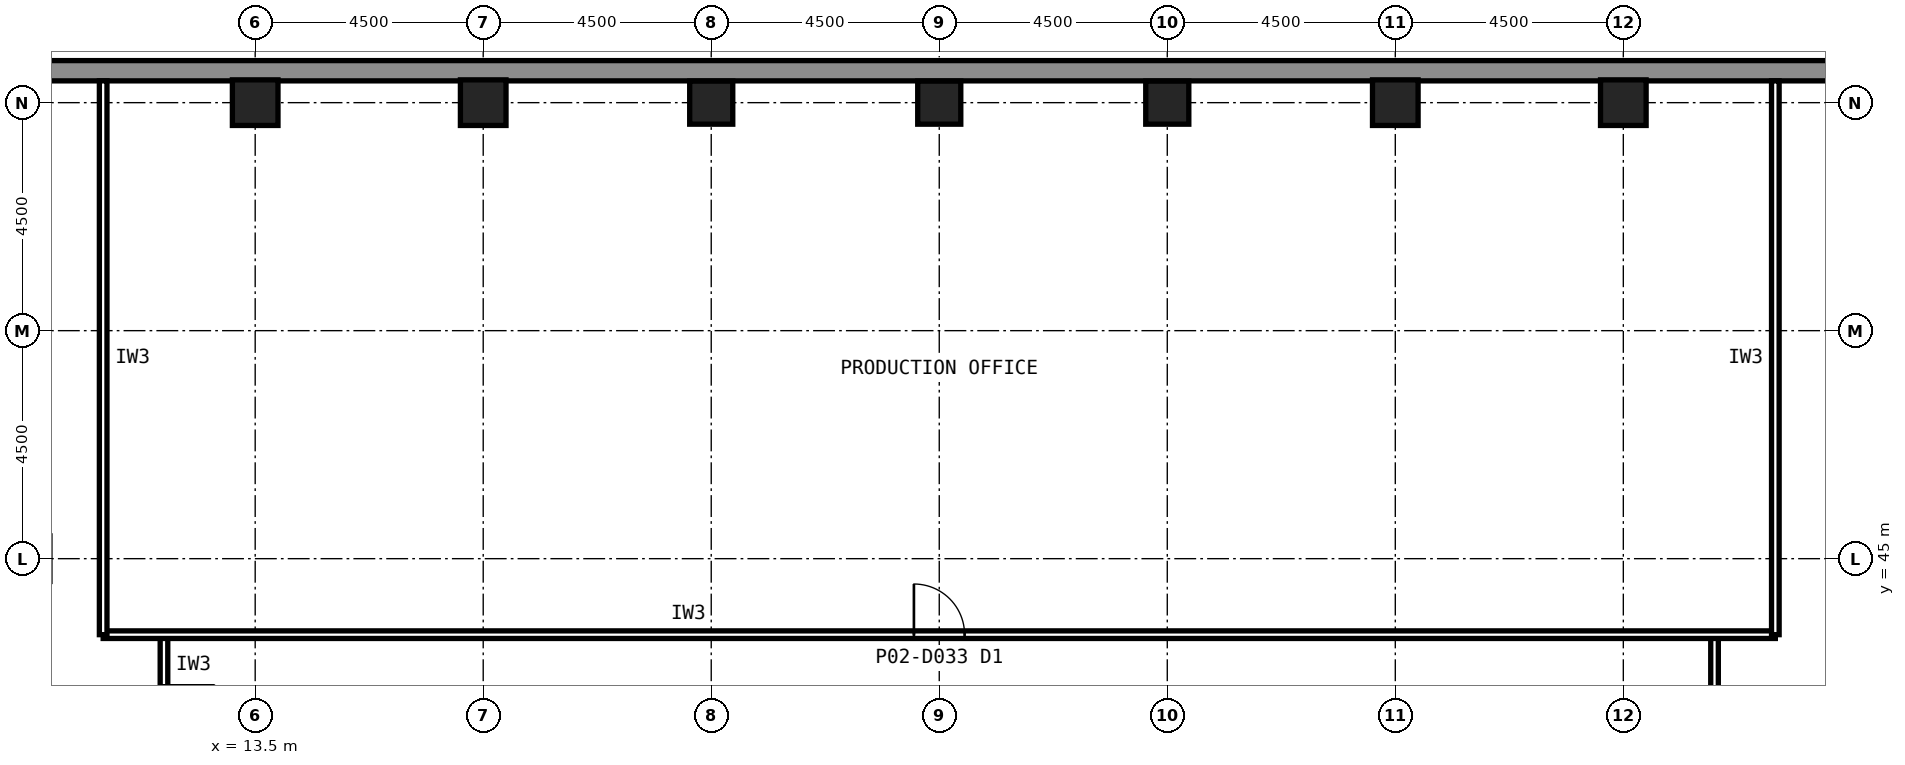
"""IFC4 building model, lengths in metres.
Left out: names, types, materials, properties, quantities, classifications, styles, units other than length and angle.
Written with IfcOpenShell. Run it as: python <this file> out.ifc"""

import sys

from ifc_helpers import new_model, si_unit, direction, frame, frame_2d, origin, origin_2d, place, context, subcontext, project, spatial, rectangle, hollow_rectangle, extrude, element, fill, save


model = new_model("IFC4")
c1 = context("Model", 3, precision=1e-05, world=origin(), true_north=direction((0.0, 1.0)))
c2 = subcontext(c1, "Body", "Model", "MODEL_VIEW")
j1 = project(units=[si_unit("LENGTHUNIT", "METRE"), si_unit("PLANEANGLEUNIT", "RADIAN")], contexts=[c1])
p1 = place(None, origin())
s1 = spatial("IfcSite", under=j1, at=p1, CompositionType="ELEMENT")
p2 = place(p1, origin())
s2 = spatial("IfcBuilding", under=s1, at=p2, CompositionType="ELEMENT")
p3 = place(p2, frame((0.0, 0.0, 6.0)))
s3 = spatial("IfcBuildingStorey", under=s2, at=p3, CompositionType="ELEMENT", Elevation=6.0)
for number, where, z_axis, x_axis in (
    (1, (40.5, 54.0, 0.0), (0.0, 0.0, 1.0), (1.0, 0.0, 0.0)),
    (2, (36.0, 54.0, 0.0), (0.0, 0.0, 1.0), (1.0, 0.0, 0.0)),
):
    element("IfcColumn", number, at=place(p3, frame(where, z_axis=z_axis, x_axis=x_axis)), inside=s3, PredefinedType="COLUMN", context=c2, shape_type="SweptSolid", body=[
        extrude(hollow_rectangle(XDim=0.9, YDim=0.9, WallThickness=0.063, at=origin_2d()), origin(), (0.0, 0.0, 1.0), 6.0),
    ])
for number, where, z_axis, x_axis in (
    (3, (31.5, 54.0, 0.0), (0.0, 0.0, 1.0), (1.0, 0.0, 0.0)),
    (4, (27.0, 54.0, 0.0), (0.0, 0.0, 1.0), (1.0, 0.0, 0.0)),
    (5, (22.5, 54.0, 0.0), (0.0, 0.0, 1.0), (1.0, 0.0, 0.0)),
):
    element("IfcColumn", number, at=place(p3, frame(where, z_axis=z_axis, x_axis=x_axis)), inside=s3, PredefinedType="COLUMN", context=c2, shape_type="SweptSolid", body=[
        extrude(hollow_rectangle(XDim=0.85, YDim=0.85, WallThickness=0.05, at=origin_2d()), origin(), (0.0, 0.0, 1.0), 6.0),
    ])
for number, where, z_axis, x_axis in (
    (6, (18.0, 54.0, 0.0), (0.0, 0.0, 1.0), (1.0, 0.0, 0.0)),
    (7, (13.5, 54.0, 0.0), (0.0, 0.0, 1.0), (1.0, 0.0, 0.0)),
):
    element("IfcColumn", number, at=place(p3, frame(where, z_axis=z_axis, x_axis=x_axis)), inside=s3, PredefinedType="COLUMN", context=c2, shape_type="SweptSolid", body=[
        extrude(hollow_rectangle(XDim=0.9, YDim=0.9, WallThickness=0.063, at=origin_2d()), origin(), (0.0, 0.0, 1.0), 6.0),
    ])
p4 = place(p3, frame((-4.761, 54.63, 0.0), z_axis=(0.0, 0.0, 1.0), x_axis=(1.0, 0.0, 0.0)))
e8 = element("IfcWall", 8, at=p4, inside=s3, PredefinedType="SOLIDWALL", context=c2, shape_type="SweptSolid", body=[
    extrude(rectangle(XDim=63.522, YDim=0.4, at=frame_2d((31.761, 0.0))), origin(), (0.0, 0.0, 1.0), 6.0),
])
p5 = place(p3, frame((42.3, 36.0, 0.0), z_axis=(0.0, 0.0, 1.0), x_axis=(0.0, 1.0, 0.0)))
e9 = element("IfcWall", 9, at=p5, inside=s3, PredefinedType="PARTITIONING", context=c2, shape_type="SweptSolid", body=[
    extrude(rectangle(XDim=7.5, YDim=0.15, at=frame_2d((3.75, 0.0))), origin(), (0.0, 0.0, 1.0), 5.8),
])
p6 = place(p5, frame((3.25, 0.0, 0.0)))
e10 = element("IfcOpeningElement", 10, at=p6, cuts=e9, PredefinedType="OPENING", context=c2, shape_type="SweptSolid", body=[
    extrude(rectangle(XDim=1.0, YDim=2.1, at=frame_2d((0.5, 1.05))), frame((0.0, 0.085, 0.0), z_axis=(0.0, -1.0, 0.0), x_axis=(1.0, 0.0, 0.0)), (0.0, 0.0, 1.0), 0.17),
])
p7 = place(p3, frame((11.7, 43.5, 0.0), z_axis=(0.0, 0.0, 1.0), x_axis=(0.0, -1.0, 0.0)))
e11 = element("IfcWall", 11, at=p7, inside=s3, PredefinedType="PARTITIONING", context=c2, shape_type="SweptSolid", body=[
    extrude(rectangle(XDim=3.0, YDim=0.15, at=frame_2d((1.5, 0.0))), origin(), (0.0, 0.0, 1.0), 5.8),
])
p8 = place(p7, frame((1.0, 0.0, 0.0)))
e12 = element("IfcOpeningElement", 12, at=p8, cuts=e11, PredefinedType="OPENING", context=c2, shape_type="SweptSolid", body=[
    extrude(rectangle(XDim=1.0, YDim=2.1, at=frame_2d((0.5, 1.05))), frame((0.0, 0.085, 0.0), z_axis=(0.0, -1.0, 0.0), x_axis=(1.0, 0.0, 0.0)), (0.0, 0.0, 1.0), 0.17),
])
p9 = place(p3, frame((10.5, 43.5, 0.0), z_axis=(0.0, 0.0, 1.0), x_axis=(1.0, 0.0, 0.0)))
e13 = element("IfcWall", 13, at=p9, inside=s3, PredefinedType="PARTITIONING", context=c2, shape_type="SweptSolid", body=[
    extrude(rectangle(XDim=33.0, YDim=0.15, at=frame_2d((16.5, 0.0))), origin(), (0.0, 0.0, 1.0), 5.8),
])
p10 = place(p9, frame((16.0, 0.0, 0.0)))
e14 = element("IfcOpeningElement", 14, at=p10, cuts=e13, PredefinedType="OPENING", context=c2, shape_type="SweptSolid", body=[
    extrude(rectangle(XDim=1.0, YDim=2.1, at=frame_2d((0.5, 1.05))), frame((0.0, 0.085, 0.0), z_axis=(0.0, -1.0, 0.0), x_axis=(1.0, 0.0, 0.0)), (0.0, 0.0, 1.0), 0.17),
])
for number, where, z_axis, x_axis in (
    (15, (43.5, 43.5, 0.0), (0.0, 0.0, 1.0), (0.0, 1.0, 0.0)),
    (16, (10.5, 54.43, 0.0), (0.0, 0.0, 1.0), (0.0, -1.0, 0.0)),
):
    element("IfcWall", number, at=place(p3, frame(where, z_axis=z_axis, x_axis=x_axis)), inside=s3, PredefinedType="PARTITIONING", context=c2, shape_type="SweptSolid", body=[
        extrude(rectangle(XDim=10.93, YDim=0.15, at=frame_2d((5.465, 0.0))), origin(), (0.0, 0.0, 1.0), 5.8),
    ])
p11 = place(p10, origin())
e17 = element("IfcDoor", 17, at=p11, inside=s3, OperationType="SINGLE_SWING_LEFT", PredefinedType="DOOR", context=c2, shape_type="SweptSolid", body=[
    extrude(rectangle(XDim=1.0, YDim=2.1, at=frame_2d((0.5, 1.05))), frame((0.0, 0.025, 0.0), z_axis=(0.0, -1.0, 0.0), x_axis=(1.0, 0.0, 0.0)), (0.0, 0.0, 1.0), 0.05),
])
fill(e14, e17)
save(model, sys.argv[1])
